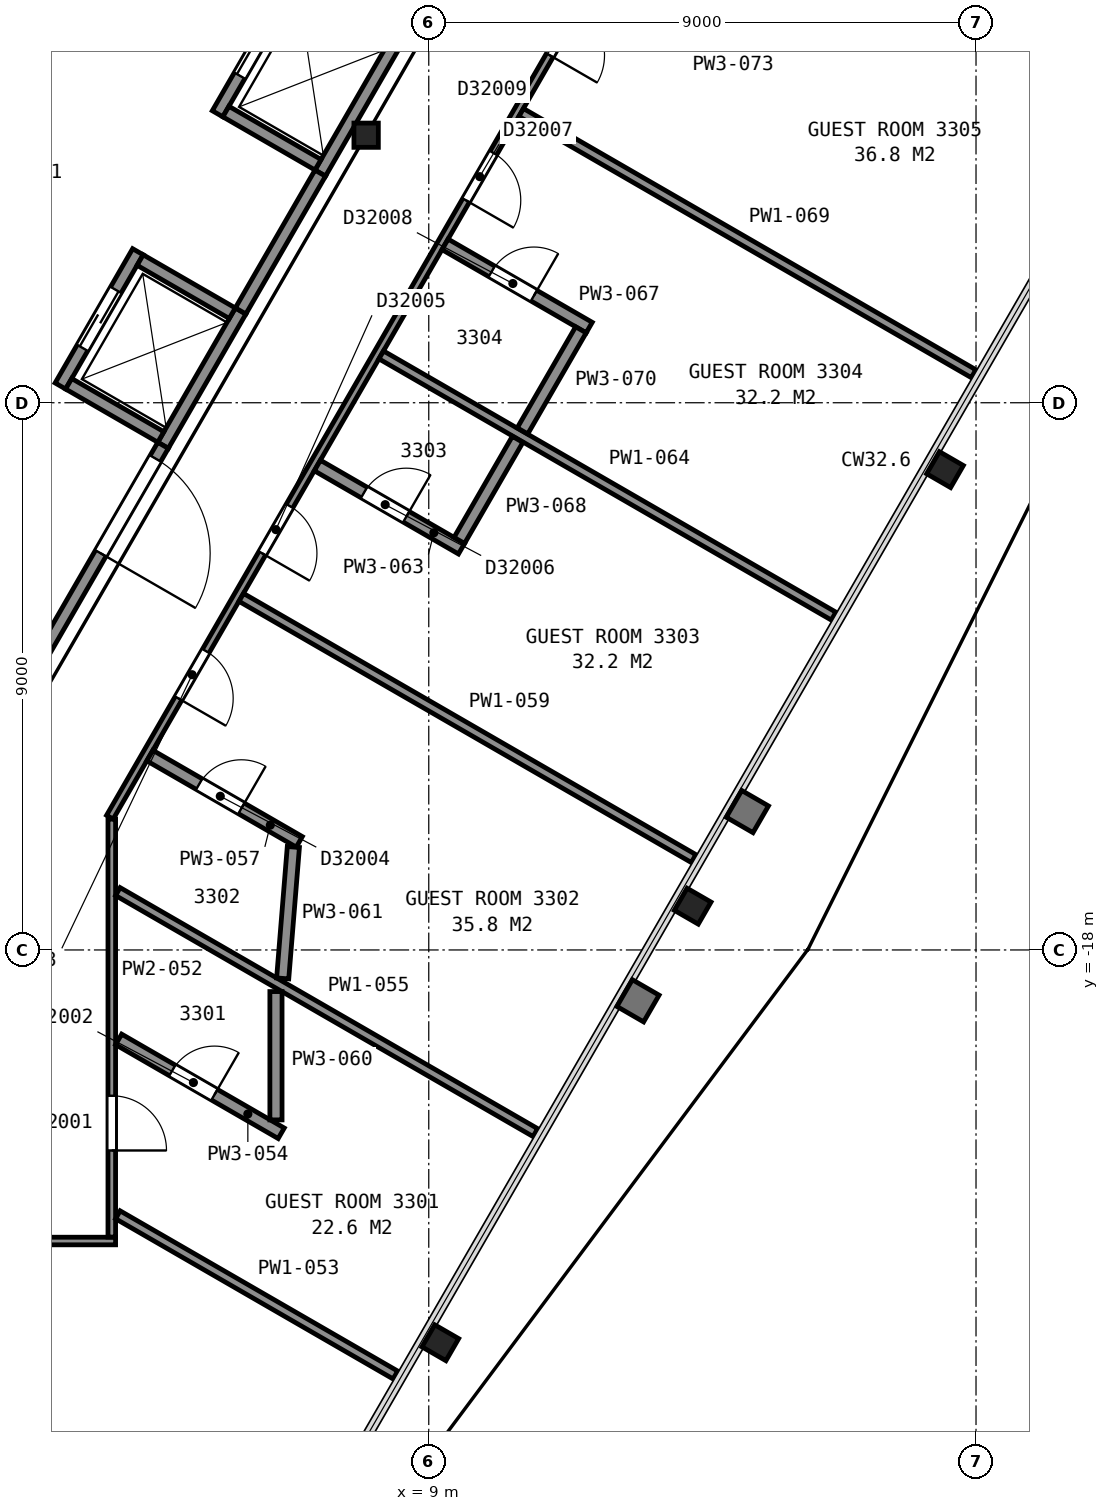
"""IFC4 building model, lengths in metres.
Left out: names, types, materials, properties, quantities, classifications, styles, units other than length and angle.
Written with IfcOpenShell. Run it as: python <this file> out.ifc"""

import sys

from ifc_helpers import new_model, si_unit, direction, frame, frame_2d, origin, origin_2d, place, context, subcontext, project, spatial, rectangle, i_section, extrude, element, fill, save


model = new_model("IFC4")
c1 = context("Model", 3, precision=1e-05, world=origin(), true_north=direction((0.0, 1.0)))
c2 = subcontext(c1, "Body", "Model", "MODEL_VIEW")
j1 = project(units=[si_unit("LENGTHUNIT", "METRE"), si_unit("PLANEANGLEUNIT", "RADIAN")], contexts=[c1])
p1 = place(None, origin())
s1 = spatial("IfcSite", under=j1, at=p1, CompositionType="ELEMENT")
p2 = place(p1, origin())
s2 = spatial("IfcBuilding", under=s1, at=p2, CompositionType="ELEMENT")
p3 = place(p2, frame((0.0, 0.0, 136.0)))
s3 = spatial("IfcBuildingStorey", under=s2, at=p3, CompositionType="ELEMENT", Elevation=136.0)
for number, where, z_axis, x_axis in (
    (1, (9.19, -24.46, 0.0), (0.0, 0.0, 1.0), (-0.5, -0.866, 0.0)),
    (2, (13.34, -17.28, 0.0), (0.0, 0.0, 1.0), (-0.5, -0.866, 0.0)),
    (3, (17.49, -10.1, 0.0), (0.0, 0.0, 1.0), (-0.5, -0.866, 0.0)),
):
    element("IfcColumn", number, at=place(p3, frame(where, z_axis=z_axis, x_axis=x_axis)), inside=s3, PredefinedType="COLUMN", context=c2, shape_type="SweptSolid", body=[
        extrude(i_section(OverallWidth=0.419, OverallDepth=0.455, WebThickness=0.042, FlangeThickness=0.068, FilletRadius=0.015, at=origin_2d()), origin(), (0.0, 0.0, 1.0), 3.6),
    ])
p4 = place(p3, frame((7.97, -4.6, 0.0), z_axis=(0.0, 0.0, 1.0), x_axis=(1.0, 0.0, 0.0)))
e4 = element("IfcColumn", 4, at=p4, inside=s3, PredefinedType="COLUMN", context=c2, shape_type="SweptSolid", body=[
    extrude(i_section(OverallWidth=0.401, OverallDepth=0.399, WebThickness=0.025, FlangeThickness=0.04, FilletRadius=0.015, at=origin_2d()), origin(), (0.0, 0.0, 1.0), 3.6),
])
p5 = place(p3, frame((4.63, -9.7, 0.0), z_axis=(0.0, 0.0, 1.0), x_axis=(0.500062241894, 0.865989465428, 0.0)))
e5 = element("IfcWall", 5, at=p5, inside=s3, PredefinedType="PARTITIONING", context=c2, shape_type="SweptSolid", body=[
    extrude(rectangle(XDim=2.55, YDim=0.2, at=frame_2d((1.275, 0.0))), origin(), (0.0, 0.0, 1.0), 3.6),
])
p6 = place(p3, frame((7.216, -5.222, 0.0), z_axis=(0.0, 0.0, 1.0), x_axis=(0.499990435942, 0.866030925526, 0.0)))
e6 = element("IfcWall", 6, at=p6, inside=s3, PredefinedType="PARTITIONING", context=c2, shape_type="SweptSolid", body=[
    extrude(rectangle(XDim=2.55, YDim=0.2, at=frame_2d((1.275, 0.0))), origin(), (0.0, 0.0, 1.0), 3.6),
])
p7 = place(p3, frame((2.942, -8.725, 0.0), z_axis=(0.0, 0.0, 1.0), x_axis=(0.500020783669, 0.866013403995, 0.0)))
e7 = element("IfcWall", 7, at=p7, inside=s3, PredefinedType="PARTITIONING", context=c2, shape_type="SweptSolid", body=[
    extrude(rectangle(XDim=2.55, YDim=0.2, at=frame_2d((1.275, 0.0))), origin(), (0.0, 0.0, 1.0), 3.6),
])
p8 = place(p7, frame((0.725, 0.0, 0.0)))
e8 = element("IfcOpeningElement", 8, at=p8, cuts=e7, PredefinedType="OPENING", context=c2, shape_type="SweptSolid", body=[
    extrude(rectangle(XDim=1.1, YDim=2.1, at=frame_2d((0.55, 1.05))), frame((0.0, 0.11, 0.0), z_axis=(0.0, -1.0, 0.0), x_axis=(1.0, 0.0, 0.0)), (0.0, 0.0, 1.0), 0.22),
])
p9 = place(p3, frame((5.527, -4.247, 0.0), z_axis=(0.0, 0.0, 1.0), x_axis=(0.499938297808, 0.866061024631, 0.0)))
e9 = element("IfcWall", 9, at=p9, inside=s3, PredefinedType="PARTITIONING", context=c2, shape_type="SweptSolid", body=[
    extrude(rectangle(XDim=2.35, YDim=0.2, at=frame_2d((1.175, 0.0))), origin(), (0.0, 0.0, 1.0), 3.6),
])
p10 = place(p9, frame((0.725, 0.0, 0.0)))
e10 = element("IfcOpeningElement", 10, at=p10, cuts=e9, PredefinedType="OPENING", context=c2, shape_type="SweptSolid", body=[
    extrude(rectangle(XDim=1.1, YDim=2.1, at=frame_2d((0.55, 1.05))), frame((0.0, 0.11, 0.0), z_axis=(0.0, -1.0, 0.0), x_axis=(1.0, 0.0, 0.0)), (0.0, 0.0, 1.0), 0.22),
])
p11 = place(p3, frame((7.179, -5.086, 0.0), z_axis=(0.0, 0.0, 1.0), x_axis=(-0.866036909293, 0.499980071345, 0.0)))
e11 = element("IfcWall", 11, at=p11, inside=s3, PredefinedType="PARTITIONING", context=c2, shape_type="SweptSolid", body=[
    extrude(rectangle(XDim=1.75, YDim=0.2, at=frame_2d((0.875, 0.0))), origin(), (0.0, 0.0, 1.0), 3.6),
])
p12 = place(p3, frame((5.769, -7.528, 0.0), z_axis=(0.0, 0.0, 1.0), x_axis=(-0.866002029911, 0.500040482552, 0.0)))
e12 = element("IfcWall", 12, at=p12, inside=s3, PredefinedType="PARTITIONING", context=c2, shape_type="SweptSolid", body=[
    extrude(rectangle(XDim=1.75, YDim=0.2, at=frame_2d((0.875, 0.0))), origin(), (0.0, 0.0, 1.0), 3.6),
])
p13 = place(p3, frame((4.594, -9.563, 0.0), z_axis=(0.0, 0.0, 1.0), x_axis=(-0.866036909293, 0.499980071345, 0.0)))
e13 = element("IfcWall", 13, at=p13, inside=s3, PredefinedType="PARTITIONING", context=c2, shape_type="SweptSolid", body=[
    extrude(rectangle(XDim=1.75, YDim=0.2, at=frame_2d((0.875, 0.0))), origin(), (0.0, 0.0, 1.0), 3.6),
])
p14 = place(p3, frame((1.677, -14.815, 0.0), z_axis=(0.0, 0.0, 1.0), x_axis=(0.49999445743, 0.866028603765, 0.0)))
e14 = element("IfcWall", 14, at=p14, inside=s3, PredefinedType="PARTITIONING", context=c2, shape_type="SweptSolid", body=[
    extrude(rectangle(XDim=5.905, YDim=0.2, at=frame_2d((2.952, 0.0))), origin(), (0.0, 0.0, 1.0), 3.35),
])
p15 = place(p14, frame((3.855, 0.0, 0.0)))
e15 = element("IfcOpeningElement", 15, at=p15, cuts=e14, PredefinedType="OPENING", context=c2, shape_type="SweptSolid", body=[
    extrude(rectangle(XDim=1.8, YDim=2.1, at=frame_2d((0.9, 1.05))), frame((0.0, 0.11, 0.0), z_axis=(0.0, -1.0, 0.0), x_axis=(1.0, 0.0, 0.0)), (0.0, 0.0, 1.0), 0.22),
])
p16 = place(p3, frame((5.906, -7.49, 0.0), z_axis=(0.0, 0.0, 1.0), x_axis=(0.500252727967, 0.865879442048, 0.0)))
e16 = element("IfcWall", 16, at=p16, inside=s3, PredefinedType="PARTITIONING", context=c2, shape_type="SweptSolid", body=[
    extrude(rectangle(XDim=2.617, YDim=0.2, at=frame_2d((1.309, 0.0))), origin(), (0.0, 0.0, 1.0), 3.35),
])
p17 = place(p3, frame((3.85, -22.787, 0.0), z_axis=(0.0, 0.0, 1.0), x_axis=(-1.0, 0.0, 0.0)))
e17 = element("IfcWall", 17, at=p17, inside=s3, PredefinedType="PARTITIONING", context=c2, shape_type="SweptSolid", body=[
    extrude(rectangle(XDim=7.699, YDim=0.125, at=frame_2d((3.85, 0.0))), origin(), (0.0, 0.0, 1.0), 2.613),
])
p18 = place(p17, frame((1.449, 0.0, 0.0)))
e18 = element("IfcOpeningElement", 18, at=p18, cuts=e17, PredefinedType="OPENING", context=c2, shape_type="SweptSolid", body=[
    extrude(rectangle(XDim=1.0, YDim=2.1, at=frame_2d((0.5, 1.05))), frame((0.0, 0.073, 0.0), z_axis=(0.0, -1.0, 0.0), x_axis=(1.0, 0.0, 0.0)), (0.0, 0.0, 1.0), 0.145),
])
p19 = place(p3, frame((3.787, -15.847, 0.0), z_axis=(0.0, 0.0, 1.0), x_axis=(0.0, -1.0, 0.0)))
e19 = element("IfcWall", 19, at=p19, inside=s3, PredefinedType="PARTITIONING", context=c2, shape_type="SweptSolid", body=[
    extrude(rectangle(XDim=6.875, YDim=0.125, at=frame_2d((3.438, 0.0))), origin(), (0.0, 0.0, 1.0), 2.613),
])
p20 = place(p19, frame((4.551, 0.0, 0.0)))
e20 = element("IfcOpeningElement", 20, at=p20, cuts=e19, PredefinedType="OPENING", context=c2, shape_type="SweptSolid", body=[
    extrude(rectangle(XDim=0.9, YDim=2.1, at=frame_2d((0.45, 1.05))), frame((0.0, 0.073, 0.0), z_axis=(0.0, -1.0, 0.0), x_axis=(1.0, 0.0, 0.0)), (0.0, 0.0, 1.0), 0.145),
])
p21 = place(p3, frame((3.887, -22.356, 0.0), z_axis=(0.0, 0.0, 1.0), x_axis=(0.866039804031, -0.499975057213, 0.0)))
e21 = element("IfcWall", 21, at=p21, inside=s3, PredefinedType="PARTITIONING", context=c2, shape_type="SweptSolid", body=[
    extrude(rectangle(XDim=5.271, YDim=0.15, at=frame_2d((2.635, 0.0))), origin(), (0.0, 0.0, 1.0), 2.613),
])
p22 = place(p3, frame((3.899, -19.471, 0.0), z_axis=(0.0, 0.0, 1.0), x_axis=(0.866015731669, -0.500016752221, 0.0)))
e22 = element("IfcWall", 22, at=p22, inside=s3, PredefinedType="PARTITIONING", context=c2, shape_type="SweptSolid", body=[
    extrude(rectangle(XDim=3.088, YDim=0.2, at=frame_2d((1.544, 0.0))), origin(), (0.0, 0.0, 1.0), 2.613),
])
p23 = place(p22, frame((1.02, 0.0, 0.0)))
e23 = element("IfcOpeningElement", 23, at=p23, cuts=e22, PredefinedType="OPENING", context=c2, shape_type="SweptSolid", body=[
    extrude(rectangle(XDim=0.8, YDim=2.1, at=frame_2d((0.4, 1.05))), frame((0.0, 0.11, 0.0), z_axis=(0.0, -1.0, 0.0), x_axis=(1.0, 0.0, 0.0)), (0.0, 0.0, 1.0), 0.22),
])
p24 = place(p3, frame((3.887, -17.04, 0.0), z_axis=(0.0, 0.0, 1.0), x_axis=(0.866046118416, -0.499964119488, 0.0)))
e24 = element("IfcWall", 24, at=p24, inside=s3, PredefinedType="PARTITIONING", context=c2, shape_type="SweptSolid", body=[
    extrude(rectangle(XDim=7.929, YDim=0.15, at=frame_2d((3.964, 0.0))), origin(), (0.0, 0.0, 1.0), 2.613),
])
p25 = place(p3, frame((15.962, 5.326, 0.0), z_axis=(0.0, 0.0, 1.0), x_axis=(-0.499992829944, -0.866029543379, 0.0)))
e25 = element("IfcWall", 25, at=p25, inside=s3, PredefinedType="PARTITIONING", context=c2, shape_type="SweptSolid", body=[
    extrude(rectangle(XDim=24.413, YDim=0.125, at=frame_2d((12.207, 0.0))), origin(), (0.0, 0.0, 1.0), 2.613),
])
p26 = place(p25, frame((21.258, 0.0, 0.0)))
e26 = element("IfcOpeningElement", 26, at=p26, cuts=e25, PredefinedType="OPENING", context=c2, shape_type="SweptSolid", body=[
    extrude(rectangle(XDim=0.9, YDim=2.1, at=frame_2d((0.45, 1.05))), frame((0.0, 0.073, 0.0), z_axis=(0.0, -1.0, 0.0), x_axis=(1.0, 0.0, 0.0)), (0.0, 0.0, 1.0), 0.145),
])
p27 = place(p25, frame((18.502, 0.0, 0.0)))
e27 = element("IfcOpeningElement", 27, at=p27, cuts=e25, PredefinedType="OPENING", context=c2, shape_type="SweptSolid", body=[
    extrude(rectangle(XDim=0.9, YDim=2.1, at=frame_2d((0.45, 1.05))), frame((0.0, 0.073, 0.0), z_axis=(0.0, -1.0, 0.0), x_axis=(1.0, 0.0, 0.0)), (0.0, 0.0, 1.0), 0.145),
])
p28 = place(p25, frame((11.799, 0.0, 0.0)))
e28 = element("IfcOpeningElement", 28, at=p28, cuts=e25, PredefinedType="OPENING", context=c2, shape_type="SweptSolid", body=[
    extrude(rectangle(XDim=0.9, YDim=2.1, at=frame_2d((0.45, 1.05))), frame((0.0, 0.073, 0.0), z_axis=(0.0, -1.0, 0.0), x_axis=(1.0, 0.0, 0.0)), (0.0, 0.0, 1.0), 0.145),
])
p29 = place(p25, frame((9.043, 0.0, 0.0)))
e29 = element("IfcOpeningElement", 29, at=p29, cuts=e25, PredefinedType="OPENING", context=c2, shape_type="SweptSolid", body=[
    extrude(rectangle(XDim=0.9, YDim=2.1, at=frame_2d((0.45, 1.05))), frame((0.0, 0.073, 0.0), z_axis=(0.0, -1.0, 0.0), x_axis=(1.0, 0.0, 0.0)), (0.0, 0.0, 1.0), 0.145),
])
p30 = place(p25, frame((1.99, 0.0, 0.0)))
e30 = element("IfcOpeningElement", 30, at=p30, cuts=e25, PredefinedType="OPENING", context=c2, shape_type="SweptSolid", body=[
    extrude(rectangle(XDim=0.9, YDim=2.1, at=frame_2d((0.45, 1.05))), frame((0.0, 0.073, 0.0), z_axis=(0.0, -1.0, 0.0), x_axis=(1.0, 0.0, 0.0)), (0.0, 0.0, 1.0), 0.145),
])
p31 = place(p3, frame((6.871, -16.222, 0.0), z_axis=(0.0, 0.0, 1.0), x_axis=(-0.866048046904, 0.499960778915, 0.0)))
e31 = element("IfcWall", 31, at=p31, inside=s3, PredefinedType="PARTITIONING", context=c2, shape_type="SweptSolid", body=[
    extrude(rectangle(XDim=2.838, YDim=0.2, at=frame_2d((1.419, 0.0))), origin(), (0.0, 0.0, 1.0), 2.613),
])
p32 = place(p31, frame((1.1, 0.0, 0.0)))
e32 = element("IfcOpeningElement", 32, at=p32, cuts=e31, PredefinedType="OPENING", context=c2, shape_type="SweptSolid", body=[
    extrude(rectangle(XDim=0.8, YDim=2.1, at=frame_2d((0.4, 1.05))), frame((0.0, 0.11, 0.0), z_axis=(0.0, -1.0, 0.0), x_axis=(1.0, 0.0, 0.0)), (0.0, 0.0, 1.0), 0.22),
])
p33 = place(p3, frame((5.916, -12.201, 0.0), z_axis=(0.0, 0.0, 1.0), x_axis=(0.865995804368, -0.50005126419, 0.0)))
e33 = element("IfcWall", 33, at=p33, inside=s3, PredefinedType="PARTITIONING", context=c2, shape_type="SweptSolid", body=[
    extrude(rectangle(XDim=8.591, YDim=0.15, at=frame_2d((4.295, 0.0))), origin(), (0.0, 0.0, 1.0), 2.613),
])
p34 = place(p3, frame((6.487, -20.795, 0.0), z_axis=(0.0, 0.0, 1.0), x_axis=(0.0, 1.0, 0.0)))
e34 = element("IfcWall", 34, at=p34, inside=s3, PredefinedType="PARTITIONING", context=c2, shape_type="SweptSolid", body=[
    extrude(rectangle(XDim=2.111, YDim=0.2, at=frame_2d((1.055, 0.0))), origin(), (0.0, 0.0, 1.0), 2.613),
])
p35 = place(p3, frame((6.598, -18.468, 0.0), z_axis=(0.0, 0.0, 1.0), x_axis=(0.080948878916, 0.996718254575, 0.0)))
e35 = element("IfcWall", 35, at=p35, inside=s3, PredefinedType="PARTITIONING", context=c2, shape_type="SweptSolid", body=[
    extrude(rectangle(XDim=2.168, YDim=0.2, at=frame_2d((1.084, 0.0))), origin(), (0.0, 0.0, 1.0), 2.613),
])
p36 = place(p3, frame((7.168, -10.032, 0.0), z_axis=(0.0, 0.0, 1.0), x_axis=(0.86596722502, -0.50010075504, 0.0)))
e36 = element("IfcWall", 36, at=p36, inside=s3, PredefinedType="PARTITIONING", context=c2, shape_type="SweptSolid", body=[
    extrude(rectangle(XDim=2.737, YDim=0.2, at=frame_2d((1.369, 0.0))), origin(), (0.0, 0.0, 1.0), 2.613),
])
p37 = place(p36, frame((0.887, 0.0, 0.0)))
e37 = element("IfcOpeningElement", 37, at=p37, cuts=e36, PredefinedType="OPENING", context=c2, shape_type="SweptSolid", body=[
    extrude(rectangle(XDim=0.8, YDim=2.1, at=frame_2d((0.4, 1.05))), frame((0.0, 0.11, 0.0), z_axis=(0.0, -1.0, 0.0), x_axis=(1.0, 0.0, 0.0)), (0.0, 0.0, 1.0), 0.22),
])
p38 = place(p3, frame((8.218, -8.213, 0.0), z_axis=(0.0, 0.0, 1.0), x_axis=(0.865997709989, -0.500047963993, 0.0)))
e38 = element("IfcWall", 38, at=p38, inside=s3, PredefinedType="PARTITIONING", context=c2, shape_type="SweptSolid", body=[
    extrude(rectangle(XDim=8.592, YDim=0.15, at=frame_2d((4.296, 0.0))), origin(), (0.0, 0.0, 1.0), 2.613),
])
p39 = place(p3, frame((11.639, -7.764, 0.0), z_axis=(0.0, 0.0, 1.0), x_axis=(-0.866028150195, 0.499995243048, 0.0)))
e39 = element("IfcWall", 39, at=p39, inside=s3, PredefinedType="PARTITIONING", context=c2, shape_type="SweptSolid", body=[
    extrude(rectangle(XDim=2.737, YDim=0.2, at=frame_2d((1.369, 0.0))), origin(), (0.0, 0.0, 1.0), 2.613),
])
p40 = place(p39, frame((1.05, 0.0, 0.0)))
e40 = element("IfcOpeningElement", 40, at=p40, cuts=e39, PredefinedType="OPENING", context=c2, shape_type="SweptSolid", body=[
    extrude(rectangle(XDim=0.8, YDim=2.1, at=frame_2d((0.4, 1.05))), frame((0.0, 0.11, 0.0), z_axis=(0.0, -1.0, 0.0), x_axis=(1.0, 0.0, 0.0)), (0.0, 0.0, 1.0), 0.22),
])
p41 = place(p3, frame((9.502, -11.264, 0.0), z_axis=(0.0, 0.0, 1.0), x_axis=(0.499887618105, 0.86609027778, 0.0)))
e41 = element("IfcWall", 41, at=p41, inside=s3, PredefinedType="PARTITIONING", context=c2, shape_type="SweptSolid", body=[
    extrude(rectangle(XDim=1.919, YDim=0.2, at=frame_2d((0.96, 0.0))), origin(), (0.0, 0.0, 1.0), 2.613),
])
p42 = place(p3, frame((10.52, -4.226, 0.0), z_axis=(0.0, 0.0, 1.0), x_axis=(0.866002910178, -0.500038958046, 0.0)))
e42 = element("IfcWall", 42, at=p42, inside=s3, PredefinedType="PARTITIONING", context=c2, shape_type="SweptSolid", body=[
    extrude(rectangle(XDim=8.591, YDim=0.15, at=frame_2d((4.295, 0.0))), origin(), (0.0, 0.0, 1.0), 2.613),
])
p43 = place(p3, frame((10.542, -9.463, 0.0), z_axis=(0.0, 0.0, 1.0), x_axis=(0.500214044309, 0.865901789971, 0.0)))
e43 = element("IfcWall", 43, at=p43, inside=s3, PredefinedType="PARTITIONING", context=c2, shape_type="SweptSolid", body=[
    extrude(rectangle(XDim=1.92, YDim=0.2, at=frame_2d((0.96, 0.0))), origin(), (0.0, 0.0, 1.0), 2.613),
])
p44 = place(p3, frame((13.122, 0.281, 0.0), z_axis=(0.0, 0.0, 1.0), x_axis=(0.866029425019, -0.499993034952, 0.0)))
e44 = element("IfcWall", 44, at=p44, inside=s3, PredefinedType="PARTITIONING", context=c2, shape_type="SweptSolid", body=[
    extrude(rectangle(XDim=8.591, YDim=0.15, at=frame_2d((4.296, 0.0))), origin(), (0.0, 0.0, 1.0), 2.613),
])
p45 = place(p8, origin())
e45 = element("IfcDoor", 45, at=p45, inside=s3, OperationType="SLIDING_TO_RIGHT", PredefinedType="DOOR", context=c2, shape_type="SweptSolid", body=[
    extrude(rectangle(XDim=1.1, YDim=2.1, at=frame_2d((0.55, 1.05))), frame((0.0, 0.025, 0.0), z_axis=(0.0, -1.0, 0.0), x_axis=(1.0, 0.0, 0.0)), (0.0, 0.0, 1.0), 0.05),
])
fill(e8, e45)
p46 = place(p10, origin())
e46 = element("IfcDoor", 46, at=p46, inside=s3, OperationType="SLIDING_TO_LEFT", PredefinedType="DOOR", context=c2, shape_type="SweptSolid", body=[
    extrude(rectangle(XDim=1.1, YDim=2.1, at=frame_2d((0.55, 1.05))), frame((0.0, 0.025, 0.0), z_axis=(0.0, -1.0, 0.0), x_axis=(1.0, 0.0, 0.0)), (0.0, 0.0, 1.0), 0.05),
])
fill(e10, e46)
p47 = place(p15, origin())
e47 = element("IfcDoor", 47, at=p47, inside=s3, OperationType="DOUBLE_DOOR_SINGLE_SWING", PredefinedType="DOOR", context=c2, shape_type="SweptSolid", body=[
    extrude(rectangle(XDim=1.8, YDim=2.1, at=frame_2d((0.9, 1.05))), frame((0.0, 0.025, 0.0), z_axis=(0.0, -1.0, 0.0), x_axis=(1.0, 0.0, 0.0)), (0.0, 0.0, 1.0), 0.05),
])
fill(e15, e47)
p48 = place(p20, origin())
e48 = element("IfcDoor", 48, at=p48, inside=s3, OperationType="SINGLE_SWING_RIGHT", PredefinedType="DOOR", context=c2, shape_type="SweptSolid", body=[
    extrude(rectangle(XDim=0.9, YDim=2.1, at=frame_2d((0.45, 1.05))), frame((0.0, 0.025, 0.0), z_axis=(0.0, -1.0, 0.0), x_axis=(1.0, 0.0, 0.0)), (0.0, 0.0, 1.0), 0.05),
])
fill(e20, e48)
p49 = place(p23, origin())
e49 = element("IfcDoor", 49, at=p49, inside=s3, OperationType="SINGLE_SWING_RIGHT", PredefinedType="DOOR", context=c2, shape_type="SweptSolid", body=[
    extrude(rectangle(XDim=0.8, YDim=2.1, at=frame_2d((0.4, 1.05))), frame((0.0, 0.025, 0.0), z_axis=(0.0, -1.0, 0.0), x_axis=(1.0, 0.0, 0.0)), (0.0, 0.0, 1.0), 0.05),
])
fill(e23, e49)
p50 = place(p26, origin())
e50 = element("IfcDoor", 50, at=p50, inside=s3, OperationType="SINGLE_SWING_RIGHT", PredefinedType="DOOR", context=c2, shape_type="SweptSolid", body=[
    extrude(rectangle(XDim=0.9, YDim=2.1, at=frame_2d((0.45, 1.05))), frame((0.0, 0.025, 0.0), z_axis=(0.0, -1.0, 0.0), x_axis=(1.0, 0.0, 0.0)), (0.0, 0.0, 1.0), 0.05),
])
fill(e26, e50)
p51 = place(p27, origin())
e51 = element("IfcDoor", 51, at=p51, inside=s3, OperationType="SINGLE_SWING_RIGHT", PredefinedType="DOOR", context=c2, shape_type="SweptSolid", body=[
    extrude(rectangle(XDim=0.9, YDim=2.1, at=frame_2d((0.45, 1.05))), frame((0.0, 0.025, 0.0), z_axis=(0.0, -1.0, 0.0), x_axis=(1.0, 0.0, 0.0)), (0.0, 0.0, 1.0), 0.05),
])
fill(e27, e51)
p52 = place(p28, origin())
e52 = element("IfcDoor", 52, at=p52, inside=s3, OperationType="SINGLE_SWING_RIGHT", PredefinedType="DOOR", context=c2, shape_type="SweptSolid", body=[
    extrude(rectangle(XDim=0.9, YDim=2.1, at=frame_2d((0.45, 1.05))), frame((0.0, 0.025, 0.0), z_axis=(0.0, -1.0, 0.0), x_axis=(1.0, 0.0, 0.0)), (0.0, 0.0, 1.0), 0.05),
])
fill(e28, e52)
p53 = place(p29, origin())
e53 = element("IfcDoor", 53, at=p53, inside=s3, OperationType="SINGLE_SWING_RIGHT", PredefinedType="DOOR", context=c2, shape_type="SweptSolid", body=[
    extrude(rectangle(XDim=0.9, YDim=2.1, at=frame_2d((0.45, 1.05))), frame((0.0, 0.025, 0.0), z_axis=(0.0, -1.0, 0.0), x_axis=(1.0, 0.0, 0.0)), (0.0, 0.0, 1.0), 0.05),
])
fill(e29, e53)
p54 = place(p32, origin())
e54 = element("IfcDoor", 54, at=p54, inside=s3, OperationType="SINGLE_SWING_LEFT", PredefinedType="DOOR", context=c2, shape_type="SweptSolid", body=[
    extrude(rectangle(XDim=0.8, YDim=2.1, at=frame_2d((0.4, 1.05))), frame((0.0, 0.025, 0.0), z_axis=(0.0, -1.0, 0.0), x_axis=(1.0, 0.0, 0.0)), (0.0, 0.0, 1.0), 0.05),
])
fill(e32, e54)
p55 = place(p37, origin())
e55 = element("IfcDoor", 55, at=p55, inside=s3, OperationType="SINGLE_SWING_RIGHT", PredefinedType="DOOR", context=c2, shape_type="SweptSolid", body=[
    extrude(rectangle(XDim=0.8, YDim=2.1, at=frame_2d((0.4, 1.05))), frame((0.0, 0.025, 0.0), z_axis=(0.0, -1.0, 0.0), x_axis=(1.0, 0.0, 0.0)), (0.0, 0.0, 1.0), 0.05),
])
fill(e37, e55)
p56 = place(p40, origin())
e56 = element("IfcDoor", 56, at=p56, inside=s3, OperationType="SINGLE_SWING_LEFT", PredefinedType="DOOR", context=c2, shape_type="SweptSolid", body=[
    extrude(rectangle(XDim=0.8, YDim=2.1, at=frame_2d((0.4, 1.05))), frame((0.0, 0.025, 0.0), z_axis=(0.0, -1.0, 0.0), x_axis=(1.0, 0.0, 0.0)), (0.0, 0.0, 1.0), 0.05),
])
fill(e40, e56)
save(model, sys.argv[1])
